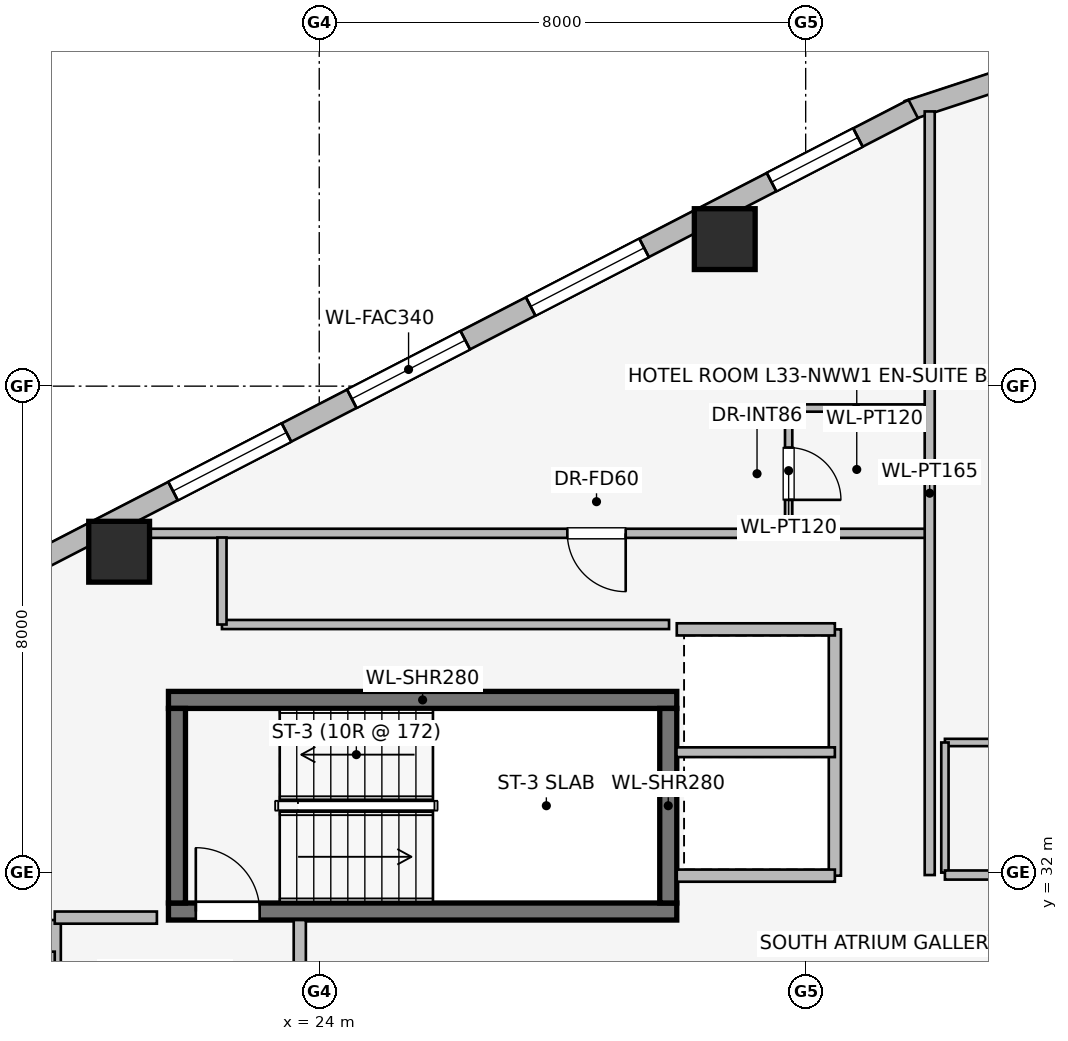
"""IFC4 building model, lengths in metres.
Left out: names, types, materials, properties, quantities, classifications, styles, units other than length and angle.
Written with IfcOpenShell. Run it as: python <this file> out.ifc"""

import sys

from ifc_helpers import new_model, si_unit, direction, frame, frame_2d, origin, origin_2d, place, context, subcontext, project, spatial, rectangle, extrude, element, fill, save


model = new_model("IFC4")
c1 = context("Model", 3, precision=1e-05, world=origin(), true_north=direction((0.0, 1.0)))
c2 = subcontext(c1, "Body", "Model", "MODEL_VIEW")
j1 = project(units=[si_unit("LENGTHUNIT", "METRE"), si_unit("PLANEANGLEUNIT", "RADIAN")], contexts=[c1])
p1 = place(None, origin())
s1 = spatial("IfcSite", under=j1, at=p1, CompositionType="ELEMENT")
p2 = place(p1, origin())
s2 = spatial("IfcBuilding", under=s1, at=p2, CompositionType="ELEMENT")
p3 = place(p2, frame((0.0, 0.0, 125.7)))
s3 = spatial("IfcBuildingStorey", under=s2, at=p3, CompositionType="ELEMENT", Elevation=125.7)
p4 = place(p3, frame((21.52, 31.36, 0.0), z_axis=(0.0, 0.0, 1.0), x_axis=(1.0, 0.0, 0.0)))
e1 = element("IfcWall", 1, at=p4, inside=s3, PredefinedType="SHEAR", context=c2, shape_type="SweptSolid", body=[
    extrude(rectangle(XDim=8.36, YDim=0.28, at=frame_2d((4.18, 0.0))), origin(), (0.0, 0.0, 1.0), 3.45),
])
p5 = place(p4, frame((0.45, 0.0, 0.0)))
e2 = element("IfcOpeningElement", 2, at=p5, cuts=e1, PredefinedType="OPENING", context=c2, shape_type="SweptSolid", body=[
    extrude(rectangle(XDim=1.05, YDim=2.0, at=frame_2d((0.525, 1.0))), frame((0.0, 0.15, 0.0), z_axis=(0.0, -1.0, 0.0), x_axis=(1.0, 0.0, 0.0)), (0.0, 0.0, 1.0), 0.3),
])
p6 = place(p3, frame((29.88, 34.84, 0.0), z_axis=(0.0, 0.0, 1.0), x_axis=(-1.0, 0.0, 0.0)))
e3 = element("IfcWall", 3, at=p6, inside=s3, PredefinedType="SHEAR", context=c2, shape_type="SweptSolid", body=[
    extrude(rectangle(XDim=8.36, YDim=0.28, at=frame_2d((4.18, 0.0))), origin(), (0.0, 0.0, 1.0), 3.45),
])
for number, where, z_axis, x_axis in (
    (4, (21.66, 34.7, 0.0), (0.0, 0.0, 1.0), (0.0, -1.0, 0.0)),
    (5, (29.74, 31.5, 0.0), (0.0, 0.0, 1.0), (0.0, 1.0, 0.0)),
):
    element("IfcWall", number, at=place(p3, frame(where, z_axis=z_axis, x_axis=x_axis)), inside=s3, PredefinedType="SHEAR", context=c2, shape_type="SweptSolid", body=[
        extrude(rectangle(XDim=3.2, YDim=0.28, at=frame_2d((1.6, 0.0))), origin(), (0.0, 0.0, 1.0), 3.45),
    ])
for number, where, z_axis, x_axis in (
    (6, (30.669, 42.418, 0.0), (0.0, 0.0, 1.0), (1.0, 0.0, 0.0)),
    (7, (20.709, 37.277, 0.0), (0.0, 0.0, 1.0), (1.0, 0.0, 0.0)),
):
    element("IfcColumn", number, at=place(p3, frame(where, z_axis=z_axis, x_axis=x_axis)), inside=s3, PredefinedType="COLUMN", context=c2, shape_type="SweptSolid", body=[
        extrude(rectangle(XDim=1.0, YDim=1.0, at=origin_2d()), origin(), (0.0, 0.0, 1.0), 3.45),
    ])
p7 = place(p3, frame((33.681, 44.532, 0.0), z_axis=(0.0, 0.0, 1.0), x_axis=(0.949937416267, 0.312440242569, 0.0)))
e8 = element("IfcWall", 8, at=p7, inside=s3, PredefinedType="STANDARD", context=c2, shape_type="SweptSolid", body=[
    extrude(rectangle(XDim=1.722, YDim=0.33, at=frame_2d((0.861, 0.0))), origin(), (0.0, 0.0, 1.0), 3.19),
])
p8 = place(p3, frame((17.169, 35.99, 0.0), z_axis=(0.0, 0.0, 1.0), x_axis=(0.888613612362, 0.458656568606, 0.0)))
e9 = element("IfcWall", 9, at=p8, inside=s3, PredefinedType="STANDARD", context=c2, shape_type="SweptSolid", body=[
    extrude(rectangle(XDim=18.681, YDim=0.34, at=frame_2d((9.34, 0.0))), origin(), (0.0, 0.0, 1.0), 3.19),
])
p9 = place(p8, frame((1.023, 0.0, 0.75)))
e10 = element("IfcOpeningElement", 10, at=p9, cuts=e9, PredefinedType="OPENING", context=c2, shape_type="SweptSolid", body=[
    extrude(rectangle(XDim=1.6, YDim=1.55, at=frame_2d((0.8, 0.775))), frame((0.0, 0.18, 0.0), z_axis=(0.0, -1.0, 0.0), x_axis=(1.0, 0.0, 0.0)), (0.0, 0.0, 1.0), 0.36),
])
p10 = place(p8, frame((4.981, 0.0, 0.75)))
e11 = element("IfcOpeningElement", 11, at=p10, cuts=e9, PredefinedType="OPENING", context=c2, shape_type="SweptSolid", body=[
    extrude(rectangle(XDim=2.1, YDim=1.5, at=frame_2d((1.05, 0.75))), frame((0.0, 0.18, 0.0), z_axis=(0.0, -1.0, 0.0), x_axis=(1.0, 0.0, 0.0)), (0.0, 0.0, 1.0), 0.36),
])
p11 = place(p8, frame((8.29, 0.0, 0.75)))
e12 = element("IfcOpeningElement", 12, at=p11, cuts=e9, PredefinedType="OPENING", context=c2, shape_type="SweptSolid", body=[
    extrude(rectangle(XDim=2.1, YDim=1.5, at=frame_2d((1.05, 0.75))), frame((0.0, 0.18, 0.0), z_axis=(0.0, -1.0, 0.0), x_axis=(1.0, 0.0, 0.0)), (0.0, 0.0, 1.0), 0.36),
])
p12 = place(p8, frame((11.6, 0.0, 0.75)))
e13 = element("IfcOpeningElement", 13, at=p12, cuts=e9, PredefinedType="OPENING", context=c2, shape_type="SweptSolid", body=[
    extrude(rectangle(XDim=2.1, YDim=1.5, at=frame_2d((1.05, 0.75))), frame((0.0, 0.18, 0.0), z_axis=(0.0, -1.0, 0.0), x_axis=(1.0, 0.0, 0.0)), (0.0, 0.0, 1.0), 0.36),
])
p13 = place(p8, frame((16.058, 0.0, 0.75)))
e14 = element("IfcOpeningElement", 14, at=p13, cuts=e9, PredefinedType="OPENING", context=c2, shape_type="SweptSolid", body=[
    extrude(rectangle(XDim=1.6, YDim=1.55, at=frame_2d((0.8, 0.775))), frame((0.0, 0.18, 0.0), z_axis=(0.0, -1.0, 0.0), x_axis=(1.0, 0.0, 0.0)), (0.0, 0.0, 1.0), 0.36),
])
p14 = place(p3, frame((19.65, 25.68, 0.0), z_axis=(0.0, 0.0, 1.0), x_axis=(0.0, 1.0, 0.0)))
e15 = element("IfcWall", 15, at=p14, inside=s3, PredefinedType="PARTITIONING", context=c2, shape_type="SweptSolid", body=[
    extrude(rectangle(XDim=5.54, YDim=0.2, at=frame_2d((2.77, 0.0))), origin(), (0.0, 0.0, 1.0), 3.19),
])
p15 = place(p14, frame((0.62, 0.0, 0.0)))
e16 = element("IfcOpeningElement", 16, at=p15, cuts=e15, PredefinedType="OPENING", context=c2, shape_type="SweptSolid", body=[
    extrude(rectangle(XDim=1.1, YDim=2.2, at=frame_2d((0.55, 1.1))), frame((0.0, 0.11, 0.0), z_axis=(0.0, -1.0, 0.0), x_axis=(1.0, 0.0, 0.0)), (0.0, 0.0, 1.0), 0.22),
])
p16 = place(p14, frame((3.12, 0.0, 0.0)))
e17 = element("IfcOpeningElement", 17, at=p16, cuts=e15, PredefinedType="OPENING", context=c2, shape_type="SweptSolid", body=[
    extrude(rectangle(XDim=1.1, YDim=2.2, at=frame_2d((0.55, 1.1))), frame((0.0, 0.11, 0.0), z_axis=(0.0, -1.0, 0.0), x_axis=(1.0, 0.0, 0.0)), (0.0, 0.0, 1.0), 0.22),
])
p17 = place(p3, frame((23.68, 25.68, 0.0), z_axis=(0.0, 0.0, 1.0), x_axis=(0.0, 1.0, 0.0)))
e18 = element("IfcWall", 18, at=p17, inside=s3, PredefinedType="PARTITIONING", context=c2, shape_type="SweptSolid", body=[
    extrude(rectangle(XDim=5.54, YDim=0.2, at=frame_2d((2.77, 0.0))), origin(), (0.0, 0.0, 1.0), 3.19),
])
p18 = place(p17, frame((1.8, 0.0, 0.0)))
e19 = element("IfcOpeningElement", 19, at=p18, cuts=e18, PredefinedType="OPENING", context=c2, shape_type="SweptSolid", body=[
    extrude(rectangle(XDim=1.05, YDim=2.0, at=frame_2d((0.525, 1.0))), frame((0.0, 0.11, 0.0), z_axis=(0.0, -1.0, 0.0), x_axis=(1.0, 0.0, 0.0)), (0.0, 0.0, 1.0), 0.22),
])
p19 = place(p3, frame((21.33, 31.26, 0.0), z_axis=(0.0, 0.0, 1.0), x_axis=(-1.0, 0.0, 0.0)))
e20 = element("IfcWall", 20, at=p19, inside=s3, PredefinedType="PARTITIONING", context=c2, shape_type="SweptSolid", body=[
    extrude(rectangle(XDim=1.68, YDim=0.2, at=frame_2d((0.84, 0.0))), origin(), (0.0, 0.0, 1.0), 3.19),
])
p20 = place(p3, frame((19.65, 30.6, 0.0), z_axis=(0.0, 0.0, 1.0), x_axis=(-1.0, 0.0, 0.0)))
e21 = element("IfcWall", 21, at=p20, inside=s3, PredefinedType="PARTITIONING", context=c2, shape_type="SweptSolid", body=[
    extrude(rectangle(XDim=2.5, YDim=0.2, at=frame_2d((1.25, 0.0))), origin(), (0.0, 0.0, 1.0), 2.09),
])
p21 = place(p3, frame((32.48, 31.95, 0.0), z_axis=(0.0, 0.0, 1.0), x_axis=(0.0, 1.0, 0.0)))
e22 = element("IfcWall", 22, at=p21, inside=s3, PredefinedType="PARTITIONING", context=c2, shape_type="SweptSolid", body=[
    extrude(rectangle(XDim=4.05, YDim=0.2, at=frame_2d((2.025, 0.0))), origin(), (0.0, 0.0, 1.0), 3.19),
])
for number, where, z_axis, x_axis in (
    (23, (29.88, 36.0, 0.0), (0.0, 0.0, 1.0), (1.0, 0.0, 0.0)),
    (24, (32.48, 31.95, 0.0), (0.0, 0.0, 1.0), (-1.0, 0.0, 0.0)),
):
    element("IfcWall", number, at=place(p3, frame(where, z_axis=z_axis, x_axis=x_axis)), inside=s3, PredefinedType="PARTITIONING", context=c2, shape_type="SweptSolid", body=[
        extrude(rectangle(XDim=2.6, YDim=0.2, at=frame_2d((1.3, 0.0))), origin(), (0.0, 0.0, 1.0), 3.19),
    ])
p22 = place(p3, frame((29.875, 33.98, 0.0), z_axis=(0.0, 0.0, 1.0), x_axis=(1.0, 0.0, 0.0)))
e25 = element("IfcWall", 25, at=p22, inside=s3, PredefinedType="PARTITIONING", context=c2, shape_type="SweptSolid", body=[
    extrude(rectangle(XDim=2.605, YDim=0.16, at=frame_2d((1.302, 0.0))), origin(), (0.0, 0.0, 1.0), 3.19),
])
p23 = place(p3, frame((34.0, 39.64, 0.0), z_axis=(0.0, 0.0, 1.0), x_axis=(-1.0, 0.0, 0.0)))
e26 = element("IfcWall", 26, at=p23, inside=s3, PredefinedType="PARTITIONING", context=c2, shape_type="SweptSolid", body=[
    extrude(rectangle(XDim=2.34, YDim=0.12, at=frame_2d((1.17, 0.0))), origin(), (0.0, 0.0, 1.0), 3.19),
])
p24 = place(p3, frame((31.72, 39.64, 0.0), z_axis=(0.0, 0.0, 1.0), x_axis=(0.0, -1.0, 0.0)))
e27 = element("IfcWall", 27, at=p24, inside=s3, PredefinedType="PARTITIONING", context=c2, shape_type="SweptSolid", body=[
    extrude(rectangle(XDim=2.06, YDim=0.12, at=frame_2d((1.03, 0.0))), origin(), (0.0, 0.0, 1.0), 3.19),
])
p25 = place(p24, frame((0.65, 0.0, 0.0)))
e28 = element("IfcOpeningElement", 28, at=p25, cuts=e27, PredefinedType="OPENING", context=c2, shape_type="SweptSolid", body=[
    extrude(rectangle(XDim=0.86, YDim=2.0, at=frame_2d((0.43, 1.0))), frame((0.0, 0.07, 0.0), z_axis=(0.0, -1.0, 0.0), x_axis=(1.0, 0.0, 0.0)), (0.0, 0.0, 1.0), 0.14),
])
p26 = place(p3, frame((34.0, 37.58, 0.0), z_axis=(0.0, 0.0, 1.0), x_axis=(-1.0, 0.0, 0.0)))
e29 = element("IfcWall", 29, at=p26, inside=s3, PredefinedType="PARTITIONING", context=c2, shape_type="SweptSolid", body=[
    extrude(rectangle(XDim=13.707, YDim=0.15, at=frame_2d((6.854, 0.0))), origin(), (0.0, 0.0, 1.0), 2.582),
])
p27 = place(p26, frame((4.96, 0.0, 0.0)))
e30 = element("IfcOpeningElement", 30, at=p27, cuts=e29, PredefinedType="OPENING", context=c2, shape_type="SweptSolid", body=[
    extrude(rectangle(XDim=0.96, YDim=2.0, at=frame_2d((0.48, 1.0))), frame((0.0, 0.085, 0.0), z_axis=(0.0, -1.0, 0.0), x_axis=(1.0, 0.0, 0.0)), (0.0, 0.0, 1.0), 0.17),
])
p28 = place(p3, frame((34.04, 31.96, 0.0), z_axis=(0.0, 0.0, 1.0), x_axis=(0.0, 1.0, 0.0)))
e31 = element("IfcWall", 31, at=p28, inside=s3, PredefinedType="PARTITIONING", context=c2, shape_type="SweptSolid", body=[
    extrude(rectangle(XDim=12.558, YDim=0.165, at=frame_2d((6.279, 0.0))), origin(), (0.0, 0.0, 1.0), 3.19),
])
p29 = place(p3, frame((36.61, 34.14, 0.0), z_axis=(0.0, 0.0, 1.0), x_axis=(-1.0, 0.0, 0.0)))
e32 = element("IfcWall", 32, at=p29, inside=s3, PredefinedType="PARTITIONING", context=c2, shape_type="SweptSolid", body=[
    extrude(rectangle(XDim=2.32, YDim=0.12, at=frame_2d((1.16, 0.0))), origin(), (0.0, 0.0, 1.0), 3.19),
])
p30 = place(p3, frame((34.29, 34.14, 0.0), z_axis=(0.0, 0.0, 1.0), x_axis=(0.0, -1.0, 0.0)))
e33 = element("IfcWall", 33, at=p30, inside=s3, PredefinedType="PARTITIONING", context=c2, shape_type="SweptSolid", body=[
    extrude(rectangle(XDim=2.14, YDim=0.12, at=frame_2d((1.07, 0.0))), origin(), (0.0, 0.0, 1.0), 3.19),
])
p31 = place(p3, frame((39.224, 31.96, 0.0), z_axis=(0.0, 0.0, 1.0), x_axis=(-1.0, 0.0, 0.0)))
e34 = element("IfcWall", 34, at=p31, inside=s3, PredefinedType="PARTITIONING", context=c2, shape_type="SweptSolid", body=[
    extrude(rectangle(XDim=4.934, YDim=0.15, at=frame_2d((2.467, 0.0))), origin(), (0.0, 0.0, 1.0), 3.19),
])
p32 = place(p31, frame((0.83, 0.0, 0.0)))
e35 = element("IfcOpeningElement", 35, at=p32, cuts=e34, PredefinedType="OPENING", context=c2, shape_type="SweptSolid", body=[
    extrude(rectangle(XDim=0.96, YDim=2.0, at=frame_2d((0.48, 1.0))), frame((0.0, 0.085, 0.0), z_axis=(0.0, -1.0, 0.0), x_axis=(1.0, 0.0, 0.0)), (0.0, 0.0, 1.0), 0.17),
])
p33 = place(p3, frame((29.753, 36.08, 0.0), z_axis=(0.0, 0.0, 1.0), x_axis=(-1.0, 0.0, 0.0)))
e36 = element("IfcWall", 36, at=p33, inside=s3, PredefinedType="PARTITIONING", context=c2, shape_type="SweptSolid", body=[
    extrude(rectangle(XDim=7.353, YDim=0.15, at=frame_2d((3.677, 0.0))), origin(), (0.0, 0.0, 1.0), 2.582),
])
p34 = place(p3, frame((22.4, 36.08, 0.0), z_axis=(0.0, 0.0, 1.0), x_axis=(0.0, 1.0, 0.0)))
e37 = element("IfcWall", 37, at=p34, inside=s3, PredefinedType="PARTITIONING", context=c2, shape_type="SweptSolid", body=[
    extrude(rectangle(XDim=1.43, YDim=0.15, at=frame_2d((0.715, 0.0))), origin(), (0.0, 0.0, 1.0), 3.19),
])
p35 = place(p10, origin())
e38 = element("IfcWindow", 38, at=p35, inside=s3, PartitioningType="SINGLE_PANEL", PredefinedType="WINDOW", context=c2, shape_type="SweptSolid", body=[
    extrude(rectangle(XDim=2.1, YDim=1.5, at=frame_2d((1.05, 0.75))), frame((0.0, 0.03, 0.0), z_axis=(0.0, -1.0, 0.0), x_axis=(1.0, 0.0, 0.0)), (0.0, 0.0, 1.0), 0.06),
])
fill(e11, e38)
p36 = place(p11, origin())
e39 = element("IfcWindow", 39, at=p36, inside=s3, PartitioningType="SINGLE_PANEL", PredefinedType="WINDOW", context=c2, shape_type="SweptSolid", body=[
    extrude(rectangle(XDim=2.1, YDim=1.5, at=frame_2d((1.05, 0.75))), frame((0.0, 0.03, 0.0), z_axis=(0.0, -1.0, 0.0), x_axis=(1.0, 0.0, 0.0)), (0.0, 0.0, 1.0), 0.06),
])
fill(e12, e39)
p37 = place(p12, origin())
e40 = element("IfcWindow", 40, at=p37, inside=s3, PartitioningType="SINGLE_PANEL", PredefinedType="WINDOW", context=c2, shape_type="SweptSolid", body=[
    extrude(rectangle(XDim=2.1, YDim=1.5, at=frame_2d((1.05, 0.75))), frame((0.0, 0.03, 0.0), z_axis=(0.0, -1.0, 0.0), x_axis=(1.0, 0.0, 0.0)), (0.0, 0.0, 1.0), 0.06),
])
fill(e13, e40)
p38 = place(p13, origin())
e41 = element("IfcWindow", 41, at=p38, inside=s3, PartitioningType="SINGLE_PANEL", PredefinedType="WINDOW", context=c2, shape_type="SweptSolid", body=[
    extrude(rectangle(XDim=1.6, YDim=1.55, at=frame_2d((0.8, 0.775))), frame((0.0, 0.03, 0.0), z_axis=(0.0, -1.0, 0.0), x_axis=(1.0, 0.0, 0.0)), (0.0, 0.0, 1.0), 0.06),
])
fill(e14, e41)
p39 = place(p5, origin())
e42 = element("IfcDoor", 42, at=p39, inside=s3, OperationType="SINGLE_SWING_LEFT", PredefinedType="DOOR", context=c2, shape_type="SweptSolid", body=[
    extrude(rectangle(XDim=1.05, YDim=2.0, at=frame_2d((0.525, 1.0))), frame((0.0, 0.025, 0.0), z_axis=(0.0, -1.0, 0.0), x_axis=(1.0, 0.0, 0.0)), (0.0, 0.0, 1.0), 0.05),
])
fill(e2, e42)
p40 = place(p25, origin())
e43 = element("IfcDoor", 43, at=p40, inside=s3, OperationType="SINGLE_SWING_RIGHT", PredefinedType="DOOR", context=c2, shape_type="SweptSolid", body=[
    extrude(rectangle(XDim=0.86, YDim=2.0, at=frame_2d((0.43, 1.0))), frame((0.0, 0.025, 0.0), z_axis=(0.0, -1.0, 0.0), x_axis=(1.0, 0.0, 0.0)), (0.0, 0.0, 1.0), 0.05),
])
fill(e28, e43)
p41 = place(p27, origin())
e44 = element("IfcDoor", 44, at=p41, inside=s3, OperationType="SINGLE_SWING_LEFT", PredefinedType="DOOR", context=c2, shape_type="SweptSolid", body=[
    extrude(rectangle(XDim=0.96, YDim=2.0, at=frame_2d((0.48, 1.0))), frame((0.0, 0.025, 0.0), z_axis=(0.0, -1.0, 0.0), x_axis=(1.0, 0.0, 0.0)), (0.0, 0.0, 1.0), 0.05),
])
fill(e30, e44)
save(model, sys.argv[1])
